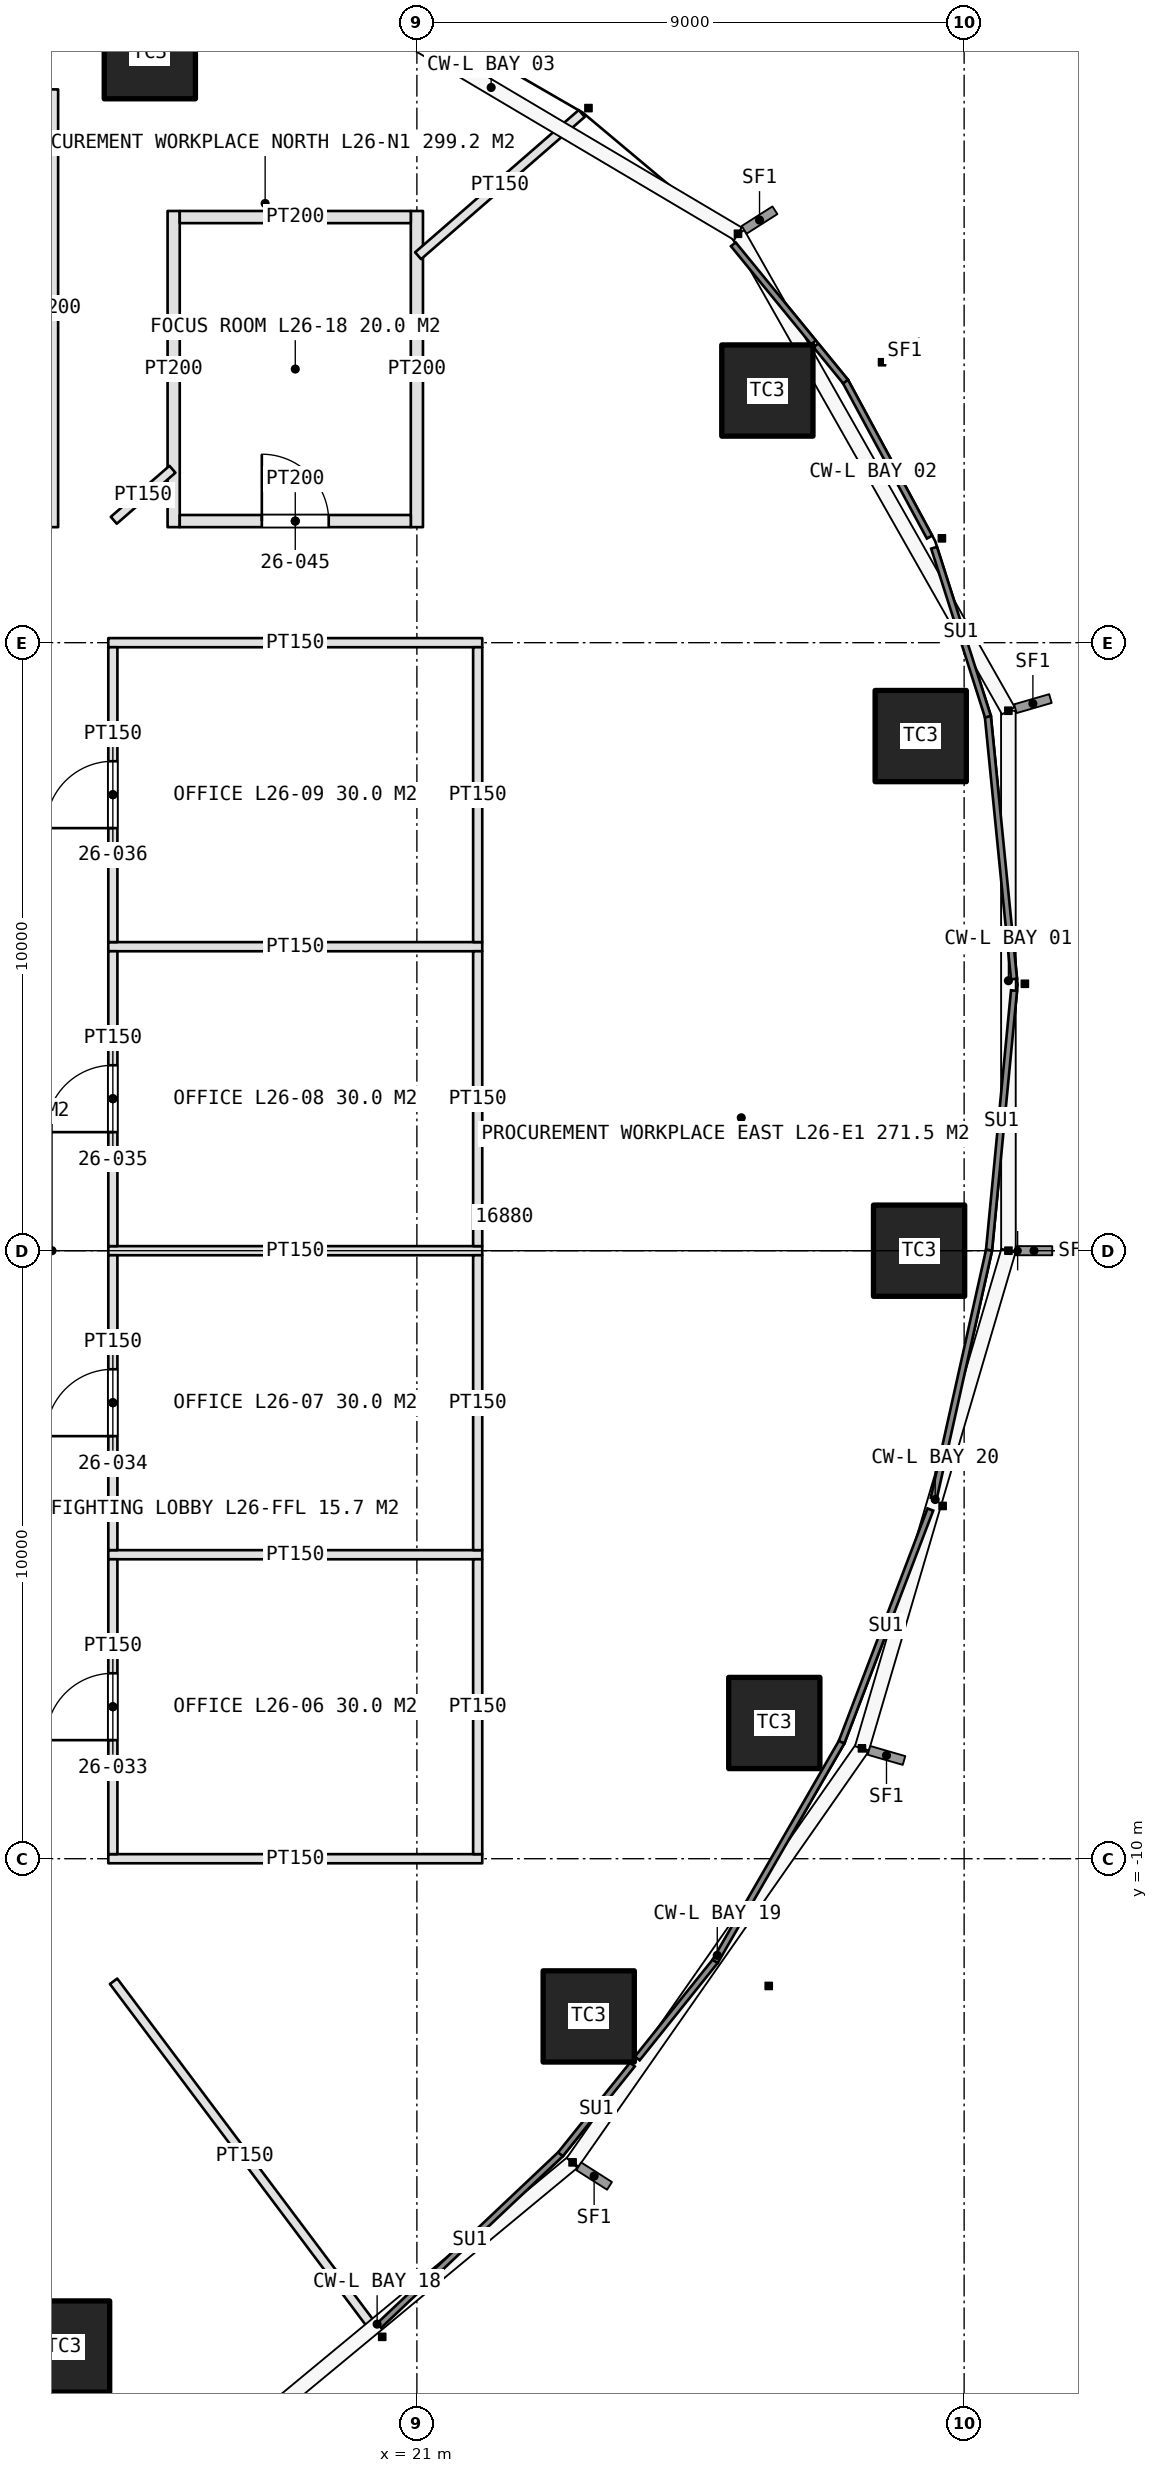
"""IFC4 building model, lengths in metres.
Left out: names, types, materials, properties, quantities, classifications, styles, units other than length and angle.
Written with IfcOpenShell. Run it as: python <this file> out.ifc"""

import sys

from ifc_helpers import new_model, si_unit, direction, frame, frame_2d, origin, origin_2d, place, context, subcontext, project, spatial, rectangle, extrude, element, fill, save


model = new_model("IFC4")
c1 = context("Model", 3, precision=1e-05, world=origin(), true_north=direction((0.0, 1.0)))
c2 = subcontext(c1, "Body", "Model", "MODEL_VIEW")
j1 = project(units=[si_unit("LENGTHUNIT", "METRE"), si_unit("PLANEANGLEUNIT", "RADIAN")], contexts=[c1])
p1 = place(None, origin())
s1 = spatial("IfcSite", under=j1, at=p1, CompositionType="ELEMENT")
p2 = place(p1, origin())
s2 = spatial("IfcBuilding", under=s1, at=p2, CompositionType="ELEMENT")
p3 = place(p2, frame((0.0, 0.0, 126.0)))
s3 = spatial("IfcBuildingStorey", under=s2, at=p3, CompositionType="ELEMENT", Elevation=126.0)
for number, where, z_axis, x_axis in (
    (1, (29.259, 0.0, 0.0), (0.0, 0.0, 1.0), (1.0, 0.0, 0.0)),
    (2, (29.286, 8.464, 0.0), (0.0, 0.0, 1.0), (1.0, 0.0, 0.0)),
    (3, (26.764, 14.147, 0.0), (0.0, 0.0, 1.0), (1.0, 0.0, 0.0)),
    (4, (16.608, 19.695, 0.0), (0.0, 0.0, 1.0), (1.0, 0.0, 0.0)),
    (5, (15.198, -18.023, 0.0), (0.0, 0.0, 1.0), (1.0, 0.0, 0.0)),
    (6, (23.826, -12.594, 0.0), (0.0, 0.0, 1.0), (1.0, 0.0, 0.0)),
    (7, (26.878, -7.768, 0.0), (0.0, 0.0, 1.0), (1.0, 0.0, 0.0)),
):
    element("IfcColumn", number, at=place(p3, frame(where, z_axis=z_axis, x_axis=x_axis)), inside=s3, PredefinedType="COLUMN", context=c2, shape_type="SweptSolid", body=[
        extrude(rectangle(XDim=1.5, YDim=1.5, at=origin_2d()), origin(), (0.0, 0.0, 1.0), 4.2),
    ])
p4 = place(p3, frame((15.0, 11.9, 0.0), z_axis=(0.0, 0.0, 1.0), x_axis=(0.0, 1.0, 0.0)))
e8 = element("IfcWall", 8, at=p4, inside=s3, PredefinedType="PARTITIONING", context=c2, shape_type="SweptSolid", body=[
    extrude(rectangle(XDim=7.2, YDim=0.2, at=frame_2d((3.6, 0.0))), origin(), (0.0, 0.0, 1.0), 3.0),
])
for number, where, z_axis, x_axis in (
    (9, (15.925, -10.0, 0.0), (0.0, 0.0, 1.0), (1.0, 0.0, 0.0)),
    (10, (15.925, -5.0, 0.0), (0.0, 0.0, 1.0), (1.0, 0.0, 0.0)),
    (11, (15.925, 0.0, 0.0), (0.0, 0.0, 1.0), (1.0, 0.0, 0.0)),
    (12, (15.925, 5.0, 0.0), (0.0, 0.0, 1.0), (1.0, 0.0, 0.0)),
    (13, (15.925, 10.0, 0.0), (0.0, 0.0, 1.0), (1.0, 0.0, 0.0)),
):
    element("IfcWall", number, at=place(p3, frame(where, z_axis=z_axis, x_axis=x_axis)), inside=s3, PredefinedType="PARTITIONING", context=c2, shape_type="SweptSolid", body=[
        extrude(rectangle(XDim=6.15, YDim=0.15, at=frame_2d((3.075, 0.0))), origin(), (0.0, 0.0, 1.0), 3.0),
    ])
p5 = place(p3, frame((16.0, -9.925, 0.0), z_axis=(0.0, 0.0, 1.0), x_axis=(0.0, 1.0, 0.0)))
e14 = element("IfcWall", 14, at=p5, inside=s3, PredefinedType="PARTITIONING", context=c2, shape_type="SweptSolid", body=[
    extrude(rectangle(XDim=4.85, YDim=0.15, at=frame_2d((2.425, 0.0))), origin(), (0.0, 0.0, 1.0), 3.0),
])
p6 = place(p5, frame((1.875, 0.0, 0.0)))
e15 = element("IfcOpeningElement", 15, at=p6, cuts=e14, PredefinedType="OPENING", context=c2, shape_type="SweptSolid", body=[
    extrude(rectangle(XDim=1.1, YDim=2.3, at=frame_2d((0.55, 1.15))), frame((0.0, 0.085, 0.0), z_axis=(0.0, -1.0, 0.0), x_axis=(1.0, 0.0, 0.0)), (0.0, 0.0, 1.0), 0.17),
])
p7 = place(p3, frame((22.0, -9.925, 0.0), z_axis=(0.0, 0.0, 1.0), x_axis=(0.0, 1.0, 0.0)))
e16 = element("IfcWall", 16, at=p7, inside=s3, PredefinedType="PARTITIONING", context=c2, shape_type="SweptSolid", body=[
    extrude(rectangle(XDim=4.85, YDim=0.15, at=frame_2d((2.425, 0.0))), origin(), (0.0, 0.0, 1.0), 3.0),
])
p8 = place(p3, frame((16.0, -4.925, 0.0), z_axis=(0.0, 0.0, 1.0), x_axis=(0.0, 1.0, 0.0)))
e17 = element("IfcWall", 17, at=p8, inside=s3, PredefinedType="PARTITIONING", context=c2, shape_type="SweptSolid", body=[
    extrude(rectangle(XDim=4.85, YDim=0.15, at=frame_2d((2.425, 0.0))), origin(), (0.0, 0.0, 1.0), 3.0),
])
p9 = place(p8, frame((1.875, 0.0, 0.0)))
e18 = element("IfcOpeningElement", 18, at=p9, cuts=e17, PredefinedType="OPENING", context=c2, shape_type="SweptSolid", body=[
    extrude(rectangle(XDim=1.1, YDim=2.3, at=frame_2d((0.55, 1.15))), frame((0.0, 0.085, 0.0), z_axis=(0.0, -1.0, 0.0), x_axis=(1.0, 0.0, 0.0)), (0.0, 0.0, 1.0), 0.17),
])
p10 = place(p3, frame((22.0, -4.925, 0.0), z_axis=(0.0, 0.0, 1.0), x_axis=(0.0, 1.0, 0.0)))
e19 = element("IfcWall", 19, at=p10, inside=s3, PredefinedType="PARTITIONING", context=c2, shape_type="SweptSolid", body=[
    extrude(rectangle(XDim=4.85, YDim=0.15, at=frame_2d((2.425, 0.0))), origin(), (0.0, 0.0, 1.0), 3.0),
])
p11 = place(p3, frame((16.0, 0.075, 0.0), z_axis=(0.0, 0.0, 1.0), x_axis=(0.0, 1.0, 0.0)))
e20 = element("IfcWall", 20, at=p11, inside=s3, PredefinedType="PARTITIONING", context=c2, shape_type="SweptSolid", body=[
    extrude(rectangle(XDim=4.85, YDim=0.15, at=frame_2d((2.425, 0.0))), origin(), (0.0, 0.0, 1.0), 3.0),
])
p12 = place(p11, frame((1.875, 0.0, 0.0)))
e21 = element("IfcOpeningElement", 21, at=p12, cuts=e20, PredefinedType="OPENING", context=c2, shape_type="SweptSolid", body=[
    extrude(rectangle(XDim=1.1, YDim=2.3, at=frame_2d((0.55, 1.15))), frame((0.0, 0.085, 0.0), z_axis=(0.0, -1.0, 0.0), x_axis=(1.0, 0.0, 0.0)), (0.0, 0.0, 1.0), 0.17),
])
p13 = place(p3, frame((22.0, 0.075, 0.0), z_axis=(0.0, 0.0, 1.0), x_axis=(0.0, 1.0, 0.0)))
e22 = element("IfcWall", 22, at=p13, inside=s3, PredefinedType="PARTITIONING", context=c2, shape_type="SweptSolid", body=[
    extrude(rectangle(XDim=4.85, YDim=0.15, at=frame_2d((2.425, 0.0))), origin(), (0.0, 0.0, 1.0), 3.0),
])
p14 = place(p3, frame((16.0, 5.075, 0.0), z_axis=(0.0, 0.0, 1.0), x_axis=(0.0, 1.0, 0.0)))
e23 = element("IfcWall", 23, at=p14, inside=s3, PredefinedType="PARTITIONING", context=c2, shape_type="SweptSolid", body=[
    extrude(rectangle(XDim=4.85, YDim=0.15, at=frame_2d((2.425, 0.0))), origin(), (0.0, 0.0, 1.0), 3.0),
])
p15 = place(p14, frame((1.875, 0.0, 0.0)))
e24 = element("IfcOpeningElement", 24, at=p15, cuts=e23, PredefinedType="OPENING", context=c2, shape_type="SweptSolid", body=[
    extrude(rectangle(XDim=1.1, YDim=2.3, at=frame_2d((0.55, 1.15))), frame((0.0, 0.085, 0.0), z_axis=(0.0, -1.0, 0.0), x_axis=(1.0, 0.0, 0.0)), (0.0, 0.0, 1.0), 0.17),
])
p16 = place(p3, frame((22.0, 5.075, 0.0), z_axis=(0.0, 0.0, 1.0), x_axis=(0.0, 1.0, 0.0)))
e25 = element("IfcWall", 25, at=p16, inside=s3, PredefinedType="PARTITIONING", context=c2, shape_type="SweptSolid", body=[
    extrude(rectangle(XDim=4.85, YDim=0.15, at=frame_2d((2.425, 0.0))), origin(), (0.0, 0.0, 1.0), 3.0),
])
for number, where, z_axis, x_axis in (
    (26, (17.0, 11.9, 0.0), (0.0, 0.0, 1.0), (0.0, 1.0, 0.0)),
    (27, (21.0, 11.9, 0.0), (0.0, 0.0, 1.0), (0.0, 1.0, 0.0)),
):
    element("IfcWall", number, at=place(p3, frame(where, z_axis=z_axis, x_axis=x_axis)), inside=s3, PredefinedType="PARTITIONING", context=c2, shape_type="SweptSolid", body=[
        extrude(rectangle(XDim=5.2, YDim=0.2, at=frame_2d((2.6, 0.0))), origin(), (0.0, 0.0, 1.0), 3.0),
    ])
p17 = place(p3, frame((17.1, 12.0, 0.0), z_axis=(0.0, 0.0, 1.0), x_axis=(1.0, 0.0, 0.0)))
e28 = element("IfcWall", 28, at=p17, inside=s3, PredefinedType="PARTITIONING", context=c2, shape_type="SweptSolid", body=[
    extrude(rectangle(XDim=3.8, YDim=0.2, at=frame_2d((1.9, 0.0))), origin(), (0.0, 0.0, 1.0), 3.0),
])
p18 = place(p17, frame((1.35, 0.0, 0.0)))
e29 = element("IfcOpeningElement", 29, at=p18, cuts=e28, PredefinedType="OPENING", context=c2, shape_type="SweptSolid", body=[
    extrude(rectangle(XDim=1.1, YDim=2.3, at=frame_2d((0.55, 1.15))), frame((0.0, 0.11, 0.0), z_axis=(0.0, -1.0, 0.0), x_axis=(1.0, 0.0, 0.0)), (0.0, 0.0, 1.0), 0.22),
])
p19 = place(p3, frame((17.1, 17.0, 0.0), z_axis=(0.0, 0.0, 1.0), x_axis=(1.0, 0.0, 0.0)))
e30 = element("IfcWall", 30, at=p19, inside=s3, PredefinedType="PARTITIONING", context=c2, shape_type="SweptSolid", body=[
    extrude(rectangle(XDim=3.8, YDim=0.2, at=frame_2d((1.9, 0.0))), origin(), (0.0, 0.0, 1.0), 3.0),
])
p20 = place(p3, frame((16.012, -12.016, 0.0), z_axis=(0.0, 0.0, 1.0), x_axis=(0.600059749679, -0.799955184254, 0.0)))
e31 = element("IfcWall", 31, at=p20, inside=s3, PredefinedType="PARTITIONING", context=c2, shape_type="SweptSolid", body=[
    extrude(rectangle(XDim=7.191, YDim=0.15, at=frame_2d((3.596, 0.0))), origin(), (0.0, 0.0, 1.0), 3.0),
])
p21 = place(p3, frame((21.02, 16.364, 0.0), z_axis=(0.0, 0.0, 1.0), x_axis=(0.75467183248, 0.656102450278, 0.0)))
e32 = element("IfcWall", 32, at=p21, inside=s3, PredefinedType="PARTITIONING", context=c2, shape_type="SweptSolid", body=[
    extrude(rectangle(XDim=3.567, YDim=0.15, at=frame_2d((1.783, 0.0))), origin(), (0.0, 0.0, 1.0), 3.0),
])
p22 = place(p3, frame((16.015, 12.013, 0.0), z_axis=(0.0, 0.0, 1.0), x_axis=(0.754654851831, 0.656121981501, 0.0)))
e33 = element("IfcWall", 33, at=p22, inside=s3, PredefinedType="PARTITIONING", context=c2, shape_type="SweptSolid", body=[
    extrude(rectangle(XDim=1.279, YDim=0.15, at=frame_2d((0.639, 0.0))), origin(), (0.0, 0.0, 1.0), 3.0),
])
p23 = place(p6, origin())
e34 = element("IfcDoor", 34, at=p23, inside=s3, OperationType="SINGLE_SWING_LEFT", PredefinedType="DOOR", context=c2, shape_type="SweptSolid", body=[
    extrude(rectangle(XDim=1.1, YDim=2.3, at=frame_2d((0.55, 1.15))), frame((0.0, 0.025, 0.0), z_axis=(0.0, -1.0, 0.0), x_axis=(1.0, 0.0, 0.0)), (0.0, 0.0, 1.0), 0.05),
])
fill(e15, e34)
p24 = place(p9, origin())
e35 = element("IfcDoor", 35, at=p24, inside=s3, OperationType="SINGLE_SWING_LEFT", PredefinedType="DOOR", context=c2, shape_type="SweptSolid", body=[
    extrude(rectangle(XDim=1.1, YDim=2.3, at=frame_2d((0.55, 1.15))), frame((0.0, 0.025, 0.0), z_axis=(0.0, -1.0, 0.0), x_axis=(1.0, 0.0, 0.0)), (0.0, 0.0, 1.0), 0.05),
])
fill(e18, e35)
p25 = place(p12, origin())
e36 = element("IfcDoor", 36, at=p25, inside=s3, OperationType="SINGLE_SWING_LEFT", PredefinedType="DOOR", context=c2, shape_type="SweptSolid", body=[
    extrude(rectangle(XDim=1.1, YDim=2.3, at=frame_2d((0.55, 1.15))), frame((0.0, 0.025, 0.0), z_axis=(0.0, -1.0, 0.0), x_axis=(1.0, 0.0, 0.0)), (0.0, 0.0, 1.0), 0.05),
])
fill(e21, e36)
p26 = place(p15, origin())
e37 = element("IfcDoor", 37, at=p26, inside=s3, OperationType="SINGLE_SWING_LEFT", PredefinedType="DOOR", context=c2, shape_type="SweptSolid", body=[
    extrude(rectangle(XDim=1.1, YDim=2.3, at=frame_2d((0.55, 1.15))), frame((0.0, 0.025, 0.0), z_axis=(0.0, -1.0, 0.0), x_axis=(1.0, 0.0, 0.0)), (0.0, 0.0, 1.0), 0.05),
])
fill(e24, e37)
p27 = place(p18, origin())
e38 = element("IfcDoor", 38, at=p27, inside=s3, OperationType="SINGLE_SWING_LEFT", PredefinedType="DOOR", context=c2, shape_type="SweptSolid", body=[
    extrude(rectangle(XDim=1.1, YDim=2.3, at=frame_2d((0.55, 1.15))), frame((0.0, 0.025, 0.0), z_axis=(0.0, -1.0, 0.0), x_axis=(1.0, 0.0, 0.0)), (0.0, 0.0, 1.0), 0.05),
])
fill(e29, e38)
save(model, sys.argv[1])
